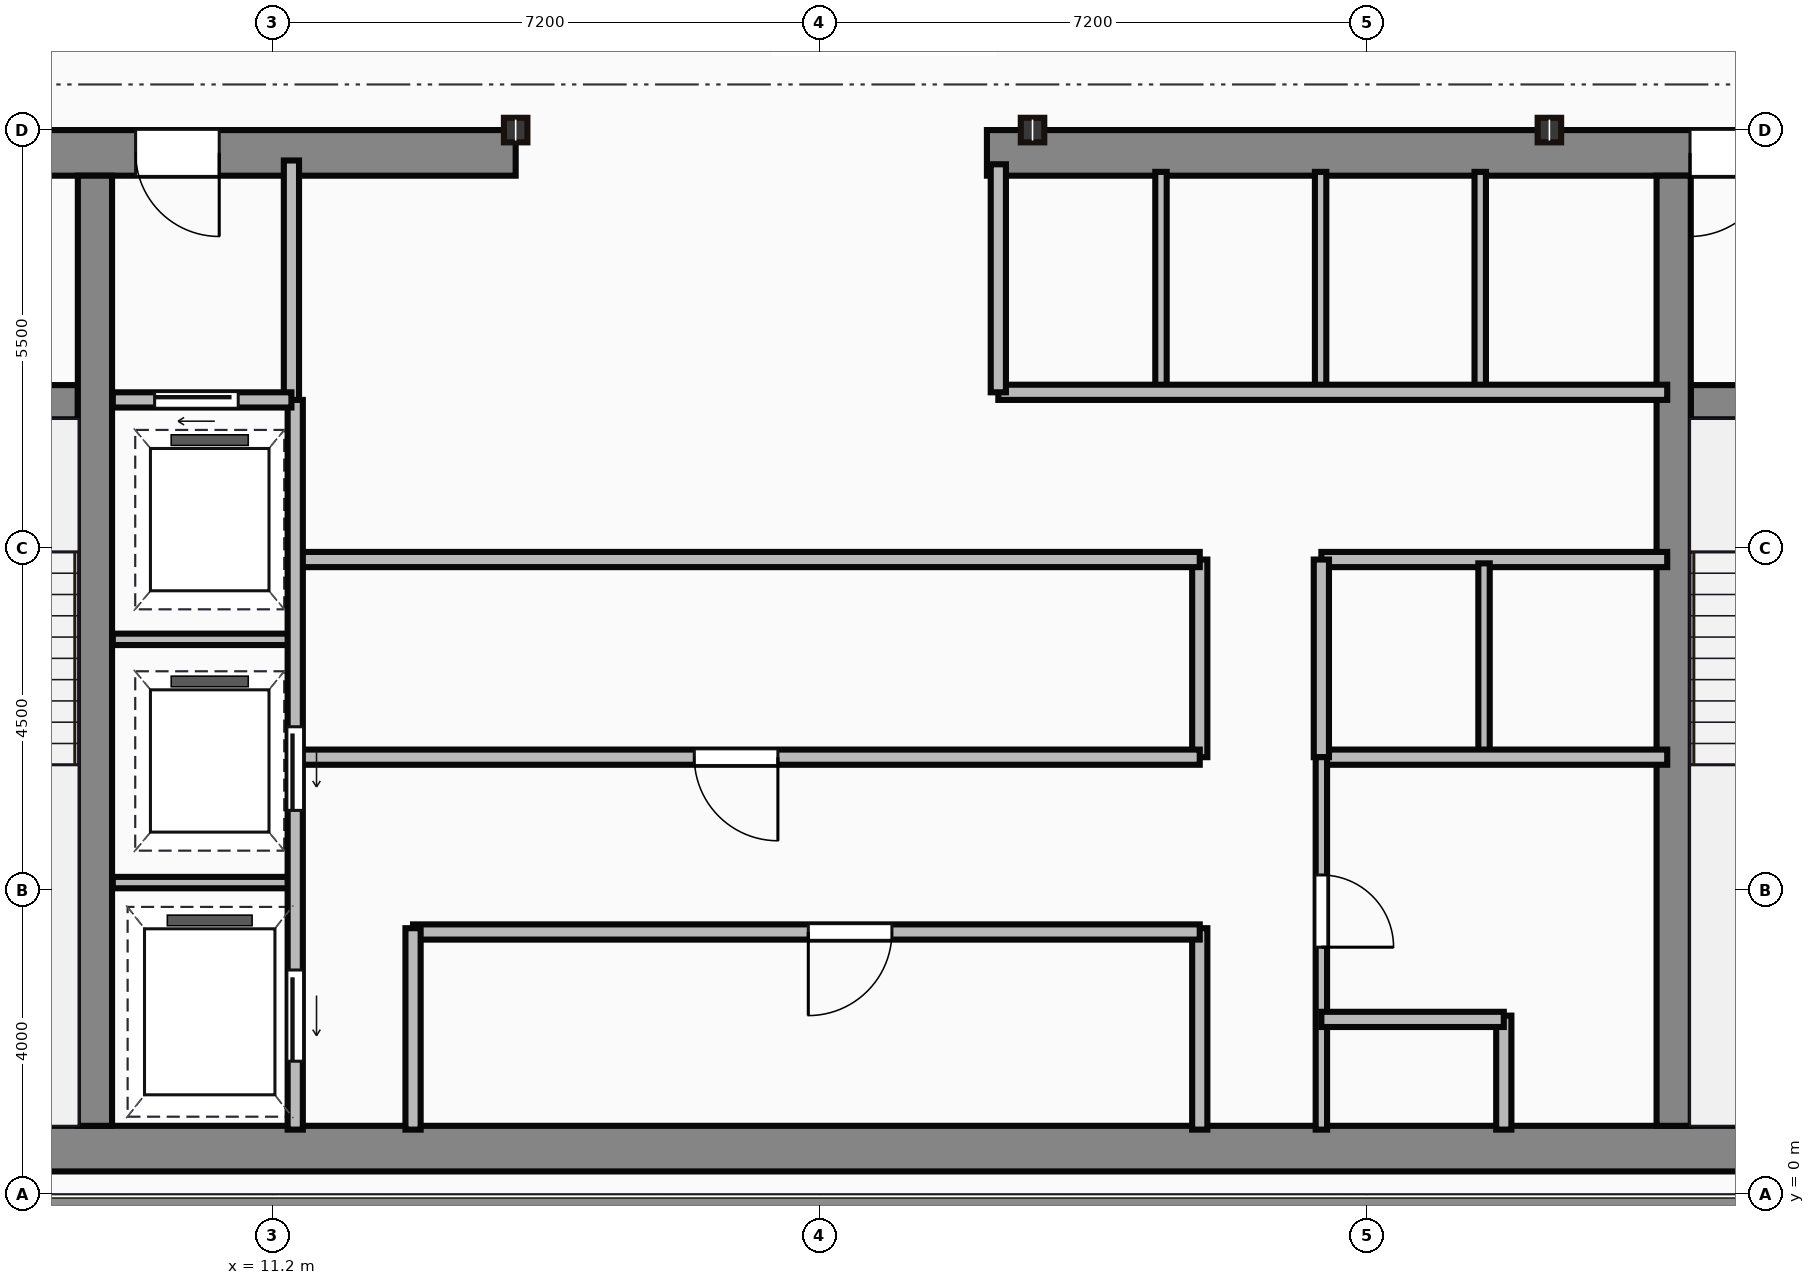
"""IFC4 building model, lengths in metres.
Left out: names, types, materials, properties, quantities, classifications, styles, units other than length and angle.
Written with IfcOpenShell. Run it as: python <this file> out.ifc"""

import sys

from ifc_helpers import new_model, si_unit, direction, frame, frame_2d, origin, origin_2d, place, context, subcontext, project, spatial, rectangle, i_section, extrude, source, transform, mapped, element, fill, save


model = new_model("IFC4")
c1 = context("Model", 3, precision=1e-05, world=origin(), true_north=direction((0.0, 1.0)))
c2 = subcontext(c1, "Body", "Model", "MODEL_VIEW")
j1 = project(units=[si_unit("LENGTHUNIT", "METRE"), si_unit("PLANEANGLEUNIT", "RADIAN")], contexts=[c1])
p1 = place(None, origin())
s1 = spatial("IfcSite", under=j1, at=p1, CompositionType="ELEMENT")
p2 = place(p1, origin())
s2 = spatial("IfcBuilding", under=s1, at=p2, CompositionType="ELEMENT")
p3 = place(p2, frame((0.0, 0.0, 292.25)))
s3 = spatial("IfcBuildingStorey", under=s2, at=p3, CompositionType="ELEMENT", Elevation=292.25)
m1 = source(origin(), c2, "Body", "SweptSolid", [
    extrude(rectangle(XDim=29.5, YDim=0.6, at=frame_2d((14.75, 0.0))), origin(), (0.0, 0.0, 1.0), 3.8),
])
p4 = place(p3, frame((4.5, 0.6, 0.0), z_axis=(0.0, 0.0, 1.0), x_axis=(1.0, 0.0, 0.0)))
e1 = element("IfcWall", 1, at=p4, inside=s3, PredefinedType="SHEAR", context=c2, shape_type="MappedRepresentation", body=[
    mapped(m1, transform((0.0, 0.0, 0.0))),
])
m2 = source(origin(), c2, "Body", "SweptSolid", [
    extrude(rectangle(XDim=9.1, YDim=0.6, at=frame_2d((4.55, 0.0))), origin(), (0.0, 0.0, 1.0), 3.8),
])
p5 = place(p3, frame((5.3, 13.7, 0.0), z_axis=(0.0, 0.0, 1.0), x_axis=(1.0, 0.0, 0.0)))
e2 = element("IfcWall", 2, at=p5, inside=s3, PredefinedType="SHEAR", context=c2, shape_type="MappedRepresentation", body=[
    mapped(m2, transform((0.0, 0.0, 0.0))),
])
p6 = place(p5, frame((4.1, 0.0, 0.0)))
e3 = element("IfcOpeningElement", 3, at=p6, cuts=e2, PredefinedType="OPENING", context=c2, shape_type="SweptSolid", body=[
    extrude(rectangle(XDim=1.1, YDim=2.15, at=frame_2d((0.55, 1.075))), frame((0.0, 0.31, 0.0), z_axis=(0.0, -1.0, 0.0), x_axis=(1.0, 0.0, 0.0)), (0.0, 0.0, 1.0), 0.62),
])
m3 = source(origin(), c2, "Body", "SweptSolid", [
    extrude(rectangle(XDim=12.6, YDim=0.6, at=frame_2d((6.3, 0.0))), origin(), (0.0, 0.0, 1.0), 3.8),
])
p7 = place(p3, frame((20.6, 13.7, 0.0), z_axis=(0.0, 0.0, 1.0), x_axis=(1.0, 0.0, 0.0)))
e4 = element("IfcWall", 4, at=p7, inside=s3, PredefinedType="SHEAR", context=c2, shape_type="MappedRepresentation", body=[
    mapped(m3, transform((0.0, 0.0, 0.0))),
])
p8 = place(p7, frame((9.25, 0.0, 0.0)))
e5 = element("IfcOpeningElement", 5, at=p8, cuts=e4, PredefinedType="OPENING", context=c2, shape_type="SweptSolid", body=[
    extrude(rectangle(XDim=1.1, YDim=2.15, at=frame_2d((0.55, 1.075))), frame((0.0, 0.31, 0.0), z_axis=(0.0, -1.0, 0.0), x_axis=(1.0, 0.0, 0.0)), (0.0, 0.0, 1.0), 0.62),
])
m4 = source(origin(), c2, "Body", "SweptSolid", [
    extrude(rectangle(XDim=12.5, YDim=0.45, at=frame_2d((6.25, 0.0))), origin(), (0.0, 0.0, 1.0), 3.8),
])
for number, where, z_axis, x_axis in (
    (6, (8.865, 0.9, 0.0), (0.0, 0.0, 1.0), (0.0, 1.0, 0.0)),
    (7, (29.635, 0.9, 0.0), (0.0, 0.0, 1.0), (0.0, 1.0, 0.0)),
):
    element("IfcWall", number, at=place(p3, frame(where, z_axis=z_axis, x_axis=x_axis)), inside=s3, PredefinedType="SHEAR", context=c2, shape_type="MappedRepresentation", body=[
        mapped(m4, transform((0.0, 0.0, 0.0))),
    ])
m5 = source(origin(), c2, "Body", "SweptSolid", [
    extrude(rectangle(XDim=3.39, YDim=0.45, at=frame_2d((1.695, 0.0))), origin(), (0.0, 0.0, 1.0), 3.8),
])
p9 = place(p3, frame((5.25, 10.42, 0.0), z_axis=(0.0, 0.0, 1.0), x_axis=(1.0, 0.0, 0.0)))
e8 = element("IfcWall", 8, at=p9, inside=s3, PredefinedType="SHEAR", context=c2, shape_type="MappedRepresentation", body=[
    mapped(m5, transform((0.0, 0.0, 0.0))),
])
p10 = place(p9, frame((1.05, 0.0, 0.0)))
e9 = element("IfcOpeningElement", 9, at=p10, cuts=e8, PredefinedType="OPENING", context=c2, shape_type="SweptSolid", body=[
    extrude(rectangle(XDim=1.1, YDim=2.15, at=frame_2d((0.55, 1.075))), frame((0.0, 0.235, 0.0), z_axis=(0.0, -1.0, 0.0), x_axis=(1.0, 0.0, 0.0)), (0.0, 0.0, 1.0), 0.47),
])
p11 = place(p3, frame((29.86, 10.42, 0.0), z_axis=(0.0, 0.0, 1.0), x_axis=(1.0, 0.0, 0.0)))
e10 = element("IfcWall", 10, at=p11, inside=s3, PredefinedType="SHEAR", context=c2, shape_type="MappedRepresentation", body=[
    mapped(m5, transform((0.0, 0.0, 0.0))),
])
p12 = place(p11, frame((1.1, 0.0, 0.0)))
e11 = element("IfcOpeningElement", 11, at=p12, cuts=e10, PredefinedType="OPENING", context=c2, shape_type="SweptSolid", body=[
    extrude(rectangle(XDim=1.1, YDim=2.15, at=frame_2d((0.55, 1.075))), frame((0.0, 0.235, 0.0), z_axis=(0.0, -1.0, 0.0), x_axis=(1.0, 0.0, 0.0)), (0.0, 0.0, 1.0), 0.47),
])
m6 = source(origin(), c2, "Body", "SweptSolid", [
    extrude(i_section(OverallWidth=0.309, OverallDepth=0.323, WebThickness=0.014, FlangeThickness=0.023, at=origin_2d()), origin(), (0.0, 0.0, 1.0), 3.8),
])
for number, where, z_axis, x_axis in (
    (12, (14.4, 14.0, 0.0), (0.0, 0.0, 1.0), (1.0, 0.0, 0.0)),
    (13, (21.2, 14.0, 0.0), (0.0, 0.0, 1.0), (1.0, 0.0, 0.0)),
    (14, (28.0, 14.0, 0.0), (0.0, 0.0, 1.0), (1.0, 0.0, 0.0)),
):
    element("IfcColumn", number, at=place(p3, frame(where, z_axis=z_axis, x_axis=x_axis)), inside=s3, PredefinedType="COLUMN", context=c2, shape_type="MappedRepresentation", body=[
        mapped(m6, transform((0.0, 0.0, 0.0))),
    ])
m7 = source(origin(), c2, "Body", "SweptSolid", [
    extrude(rectangle(XDim=3.18, YDim=0.2, at=frame_2d((1.59, 0.0))), origin(), (0.0, 0.0, 1.0), 3.5),
])
p13 = place(p3, frame((11.45, 10.42, 0.0), z_axis=(0.0, 0.0, 1.0), x_axis=(0.0, 1.0, 0.0)))
e15 = element("IfcWall", 15, at=p13, inside=s3, PredefinedType="PARTITIONING", context=c2, shape_type="MappedRepresentation", body=[
    mapped(m7, transform((0.0, 0.0, 0.0))),
])
m8 = source(origin(), c2, "Body", "SweptSolid", [
    extrude(rectangle(XDim=2.35, YDim=0.2, at=frame_2d((1.175, 0.0))), origin(), (0.0, 0.0, 1.0), 3.5),
])
p14 = place(p3, frame((9.1, 10.45, 0.0), z_axis=(0.0, 0.0, 1.0), x_axis=(1.0, 0.0, 0.0)))
e16 = element("IfcWall", 16, at=p14, inside=s3, PredefinedType="PARTITIONING", context=c2, shape_type="MappedRepresentation", body=[
    mapped(m8, transform((0.0, 0.0, 0.0))),
])
p15 = place(p14, frame((0.55, 0.0, 0.0)))
e17 = element("IfcOpeningElement", 17, at=p15, cuts=e16, PredefinedType="OPENING", context=c2, shape_type="SweptSolid", body=[
    extrude(rectangle(XDim=1.1, YDim=2.15, at=frame_2d((0.55, 1.075))), frame((0.0, 0.11, 0.0), z_axis=(0.0, -1.0, 0.0), x_axis=(1.0, 0.0, 0.0)), (0.0, 0.0, 1.0), 0.22),
])
m9 = source(origin(), c2, "Body", "SweptSolid", [
    extrude(rectangle(XDim=9.6, YDim=0.2, at=frame_2d((4.8, 0.0))), origin(), (0.0, 0.0, 1.0), 3.5),
])
p16 = place(p3, frame((11.5, 0.85, 0.0), z_axis=(0.0, 0.0, 1.0), x_axis=(0.0, 1.0, 0.0)))
e18 = element("IfcWall", 18, at=p16, inside=s3, PredefinedType="PARTITIONING", context=c2, shape_type="MappedRepresentation", body=[
    mapped(m9, transform((0.0, 0.0, 0.0))),
])
p17 = place(p16, frame((4.2, 0.0, 0.0)))
e19 = element("IfcOpeningElement", 19, at=p17, cuts=e18, PredefinedType="OPENING", context=c2, shape_type="SweptSolid", body=[
    extrude(rectangle(XDim=1.1, YDim=2.15, at=frame_2d((0.55, 1.075))), frame((0.0, 0.11, 0.0), z_axis=(0.0, -1.0, 0.0), x_axis=(1.0, 0.0, 0.0)), (0.0, 0.0, 1.0), 0.22),
])
p18 = place(p16, frame((0.9, 0.0, 0.0)))
e20 = element("IfcOpeningElement", 20, at=p18, cuts=e18, PredefinedType="OPENING", context=c2, shape_type="SweptSolid", body=[
    extrude(rectangle(XDim=1.2, YDim=2.15, at=frame_2d((0.6, 1.075))), frame((0.0, 0.11, 0.0), z_axis=(0.0, -1.0, 0.0), x_axis=(1.0, 0.0, 0.0)), (0.0, 0.0, 1.0), 0.22),
])
m10 = source(origin(), c2, "Body", "SweptSolid", [
    extrude(rectangle(XDim=2.4, YDim=0.15, at=frame_2d((1.2, 0.0))), origin(), (0.0, 0.0, 1.0), 3.5),
])
for number, where, z_axis, x_axis in (
    (21, (9.1, 4.1, 0.0), (0.0, 0.0, 1.0), (1.0, 0.0, 0.0)),
    (22, (9.1, 7.3, 0.0), (0.0, 0.0, 1.0), (1.0, 0.0, 0.0)),
):
    element("IfcWall", number, at=place(p3, frame(where, z_axis=z_axis, x_axis=x_axis)), inside=s3, PredefinedType="PARTITIONING", context=c2, shape_type="MappedRepresentation", body=[
        mapped(m10, transform((0.0, 0.0, 0.0))),
    ])
m11 = source(origin(), c2, "Body", "SweptSolid", [
    extrude(rectangle(XDim=2.65, YDim=0.2, at=frame_2d((1.325, 0.0))), origin(), (0.0, 0.0, 1.0), 3.5),
])
p19 = place(p3, frame((13.05, 0.85, 0.0), z_axis=(0.0, 0.0, 1.0), x_axis=(0.0, 1.0, 0.0)))
e23 = element("IfcWall", 23, at=p19, inside=s3, PredefinedType="PARTITIONING", context=c2, shape_type="MappedRepresentation", body=[
    mapped(m11, transform((0.0, 0.0, 0.0))),
])
m12 = source(origin(), c2, "Body", "SweptSolid", [
    extrude(rectangle(XDim=10.35, YDim=0.2, at=frame_2d((5.175, 0.0))), origin(), (0.0, 0.0, 1.0), 3.5),
])
p20 = place(p3, frame((13.05, 3.45, 0.0), z_axis=(0.0, 0.0, 1.0), x_axis=(1.0, 0.0, 0.0)))
e24 = element("IfcWall", 24, at=p20, inside=s3, PredefinedType="PARTITIONING", context=c2, shape_type="MappedRepresentation", body=[
    mapped(m12, transform((0.0, 0.0, 0.0))),
])
p21 = place(p20, frame((5.2, 0.0, 0.0)))
e25 = element("IfcOpeningElement", 25, at=p21, cuts=e24, PredefinedType="OPENING", context=c2, shape_type="SweptSolid", body=[
    extrude(rectangle(XDim=1.1, YDim=2.15, at=frame_2d((0.55, 1.075))), frame((0.0, 0.11, 0.0), z_axis=(0.0, -1.0, 0.0), x_axis=(1.0, 0.0, 0.0)), (0.0, 0.0, 1.0), 0.22),
])
p22 = place(p3, frame((23.4, 0.85, 0.0), z_axis=(0.0, 0.0, 1.0), x_axis=(0.0, 1.0, 0.0)))
e26 = element("IfcWall", 26, at=p22, inside=s3, PredefinedType="PARTITIONING", context=c2, shape_type="MappedRepresentation", body=[
    mapped(m11, transform((0.0, 0.0, 0.0))),
])
m13 = source(origin(), c2, "Body", "SweptSolid", [
    extrude(rectangle(XDim=11.85, YDim=0.2, at=frame_2d((5.925, 0.0))), origin(), (0.0, 0.0, 1.0), 3.5),
])
p23 = place(p3, frame((11.55, 5.75, 0.0), z_axis=(0.0, 0.0, 1.0), x_axis=(1.0, 0.0, 0.0)))
e27 = element("IfcWall", 27, at=p23, inside=s3, PredefinedType="PARTITIONING", context=c2, shape_type="MappedRepresentation", body=[
    mapped(m13, transform((0.0, 0.0, 0.0))),
])
p24 = place(p23, frame((5.2, 0.0, 0.0)))
e28 = element("IfcOpeningElement", 28, at=p24, cuts=e27, PredefinedType="OPENING", context=c2, shape_type="SweptSolid", body=[
    extrude(rectangle(XDim=1.1, YDim=2.15, at=frame_2d((0.55, 1.075))), frame((0.0, 0.11, 0.0), z_axis=(0.0, -1.0, 0.0), x_axis=(1.0, 0.0, 0.0)), (0.0, 0.0, 1.0), 0.22),
])
p25 = place(p3, frame((11.55, 8.35, 0.0), z_axis=(0.0, 0.0, 1.0), x_axis=(1.0, 0.0, 0.0)))
e29 = element("IfcWall", 29, at=p25, inside=s3, PredefinedType="PARTITIONING", context=c2, shape_type="MappedRepresentation", body=[
    mapped(m13, transform((0.0, 0.0, 0.0))),
])
m14 = source(origin(), c2, "Body", "SweptSolid", [
    extrude(rectangle(XDim=2.6, YDim=0.2, at=frame_2d((1.3, 0.0))), origin(), (0.0, 0.0, 1.0), 3.5),
])
p26 = place(p3, frame((23.4, 5.75, 0.0), z_axis=(0.0, 0.0, 1.0), x_axis=(0.0, 1.0, 0.0)))
e30 = element("IfcWall", 30, at=p26, inside=s3, PredefinedType="PARTITIONING", context=c2, shape_type="MappedRepresentation", body=[
    mapped(m14, transform((0.0, 0.0, 0.0))),
])
m15 = source(origin(), c2, "Body", "SweptSolid", [
    extrude(rectangle(XDim=8.8, YDim=0.2, at=frame_2d((4.4, 0.0))), origin(), (0.0, 0.0, 1.0), 3.5),
])
p27 = place(p3, frame((20.75, 10.55, 0.0), z_axis=(0.0, 0.0, 1.0), x_axis=(1.0, 0.0, 0.0)))
e31 = element("IfcWall", 31, at=p27, inside=s3, PredefinedType="PARTITIONING", context=c2, shape_type="MappedRepresentation", body=[
    mapped(m15, transform((0.0, 0.0, 0.0))),
])
m16 = source(origin(), c2, "Body", "SweptSolid", [
    extrude(rectangle(XDim=3.0, YDim=0.2, at=frame_2d((1.5, 0.0))), origin(), (0.0, 0.0, 1.0), 3.5),
])
p28 = place(p3, frame((20.75, 10.55, 0.0), z_axis=(0.0, 0.0, 1.0), x_axis=(0.0, 1.0, 0.0)))
e32 = element("IfcWall", 32, at=p28, inside=s3, PredefinedType="PARTITIONING", context=c2, shape_type="MappedRepresentation", body=[
    mapped(m16, transform((0.0, 0.0, 0.0))),
])
m17 = source(origin(), c2, "Body", "SweptSolid", [
    extrude(rectangle(XDim=2.85, YDim=0.15, at=frame_2d((1.425, 0.0))), origin(), (0.0, 0.0, 1.0), 3.5),
])
for number, where, z_axis, x_axis in (
    (33, (22.89, 10.6, 0.0), (0.0, 0.0, 1.0), (0.0, 1.0, 0.0)),
    (34, (24.99, 10.6, 0.0), (0.0, 0.0, 1.0), (0.0, 1.0, 0.0)),
    (35, (27.09, 10.6, 0.0), (0.0, 0.0, 1.0), (0.0, 1.0, 0.0)),
):
    element("IfcWall", number, at=place(p3, frame(where, z_axis=z_axis, x_axis=x_axis)), inside=s3, PredefinedType="PARTITIONING", context=c2, shape_type="MappedRepresentation", body=[
        mapped(m17, transform((0.0, 0.0, 0.0))),
    ])
m18 = source(origin(), c2, "Body", "SweptSolid", [
    extrude(rectangle(XDim=4.55, YDim=0.2, at=frame_2d((2.275, 0.0))), origin(), (0.0, 0.0, 1.0), 3.5),
])
for number, where, z_axis, x_axis in (
    (36, (25.0, 8.35, 0.0), (0.0, 0.0, 1.0), (1.0, 0.0, 0.0)),
    (37, (25.0, 5.75, 0.0), (0.0, 0.0, 1.0), (1.0, 0.0, 0.0)),
):
    element("IfcWall", number, at=place(p3, frame(where, z_axis=z_axis, x_axis=x_axis)), inside=s3, PredefinedType="PARTITIONING", context=c2, shape_type="MappedRepresentation", body=[
        mapped(m18, transform((0.0, 0.0, 0.0))),
    ])
p29 = place(p3, frame((25.0, 5.75, 0.0), z_axis=(0.0, 0.0, 1.0), x_axis=(0.0, 1.0, 0.0)))
e38 = element("IfcWall", 38, at=p29, inside=s3, PredefinedType="PARTITIONING", context=c2, shape_type="MappedRepresentation", body=[
    mapped(m14, transform((0.0, 0.0, 0.0))),
])
m19 = source(origin(), c2, "Body", "SweptSolid", [
    extrude(rectangle(XDim=2.5, YDim=0.15, at=frame_2d((1.25, 0.0))), origin(), (0.0, 0.0, 1.0), 3.5),
])
p30 = place(p3, frame((27.14, 5.8, 0.0), z_axis=(0.0, 0.0, 1.0), x_axis=(0.0, 1.0, 0.0)))
e39 = element("IfcWall", 39, at=p30, inside=s3, PredefinedType="PARTITIONING", context=c2, shape_type="MappedRepresentation", body=[
    mapped(m19, transform((0.0, 0.0, 0.0))),
])
m20 = source(origin(), c2, "Body", "SweptSolid", [
    extrude(rectangle(XDim=4.9, YDim=0.15, at=frame_2d((2.45, 0.0))), origin(), (0.0, 0.0, 1.0), 3.5),
])
p31 = place(p3, frame((25.0, 0.85, 0.0), z_axis=(0.0, 0.0, 1.0), x_axis=(0.0, 1.0, 0.0)))
e40 = element("IfcWall", 40, at=p31, inside=s3, PredefinedType="PARTITIONING", context=c2, shape_type="MappedRepresentation", body=[
    mapped(m20, transform((0.0, 0.0, 0.0))),
])
p32 = place(p31, frame((2.4, 0.0, 0.0)))
e41 = element("IfcOpeningElement", 41, at=p32, cuts=e40, PredefinedType="OPENING", context=c2, shape_type="SweptSolid", body=[
    extrude(rectangle(XDim=0.95, YDim=2.15, at=frame_2d((0.475, 1.075))), frame((0.0, 0.085, 0.0), z_axis=(0.0, -1.0, 0.0), x_axis=(1.0, 0.0, 0.0)), (0.0, 0.0, 1.0), 0.17),
])
m21 = source(origin(), c2, "Body", "SweptSolid", [
    extrude(rectangle(XDim=2.4, YDim=0.2, at=frame_2d((1.2, 0.0))), origin(), (0.0, 0.0, 1.0), 3.5),
])
p33 = place(p3, frame((25.0, 2.3, 0.0), z_axis=(0.0, 0.0, 1.0), x_axis=(1.0, 0.0, 0.0)))
e42 = element("IfcWall", 42, at=p33, inside=s3, PredefinedType="PARTITIONING", context=c2, shape_type="MappedRepresentation", body=[
    mapped(m21, transform((0.0, 0.0, 0.0))),
])
m22 = source(origin(), c2, "Body", "SweptSolid", [
    extrude(rectangle(XDim=1.5, YDim=0.2, at=frame_2d((0.75, 0.0))), origin(), (0.0, 0.0, 1.0), 3.5),
])
p34 = place(p3, frame((27.4, 0.85, 0.0), z_axis=(0.0, 0.0, 1.0), x_axis=(0.0, 1.0, 0.0)))
e43 = element("IfcWall", 43, at=p34, inside=s3, PredefinedType="PARTITIONING", context=c2, shape_type="MappedRepresentation", body=[
    mapped(m22, transform((0.0, 0.0, 0.0))),
])
m23 = source(origin(), c2, "Body", "SweptSolid", [
    extrude(rectangle(XDim=1.1, YDim=2.15, at=frame_2d((0.55, 1.075))), frame((0.0, 0.025, 0.0), z_axis=(0.0, -1.0, 0.0), x_axis=(1.0, 0.0, 0.0)), (0.0, 0.0, 1.0), 0.05),
])
p35 = place(p6, origin())
e44 = element("IfcDoor", 44, at=p35, inside=s3, OperationType="SINGLE_SWING_RIGHT", PredefinedType="DOOR", context=c2, shape_type="MappedRepresentation", body=[
    mapped(m23, transform((0.0, 0.0, 0.0))),
])
fill(e3, e44)
p36 = place(p8, origin())
e45 = element("IfcDoor", 45, at=p36, inside=s3, OperationType="SINGLE_SWING_LEFT", PredefinedType="DOOR", context=c2, shape_type="MappedRepresentation", body=[
    mapped(m23, transform((0.0, 0.0, 0.0))),
])
fill(e5, e45)
p37 = place(p15, origin())
e46 = element("IfcDoor", 46, at=p37, inside=s3, OperationType="SLIDING_TO_LEFT", PredefinedType="DOOR", context=c2, shape_type="MappedRepresentation", body=[
    mapped(m23, transform((0.0, 0.0, 0.0))),
])
fill(e17, e46)
p38 = place(p17, frame((1.1, 0.0, 0.0), z_axis=(0.0, 0.0, 1.0), x_axis=(-1.0, 0.0, 0.0)))
e47 = element("IfcDoor", 47, at=p38, inside=s3, OperationType="SLIDING_TO_LEFT", PredefinedType="DOOR", context=c2, shape_type="MappedRepresentation", body=[
    mapped(m23, transform((0.0, 0.0, 0.0))),
])
fill(e19, e47)
m24 = source(origin(), c2, "Body", "SweptSolid", [
    extrude(rectangle(XDim=1.2, YDim=2.15, at=frame_2d((0.6, 1.075))), frame((0.0, 0.025, 0.0), z_axis=(0.0, -1.0, 0.0), x_axis=(1.0, 0.0, 0.0)), (0.0, 0.0, 1.0), 0.05),
])
p39 = place(p18, frame((1.2, 0.0, 0.0), z_axis=(0.0, 0.0, 1.0), x_axis=(-1.0, 0.0, 0.0)))
e48 = element("IfcDoor", 48, at=p39, inside=s3, OperationType="SLIDING_TO_LEFT", PredefinedType="DOOR", context=c2, shape_type="MappedRepresentation", body=[
    mapped(m24, transform((0.0, 0.0, 0.0))),
])
fill(e20, e48)
p40 = place(p21, origin())
e49 = element("IfcDoor", 49, at=p40, inside=s3, OperationType="SINGLE_SWING_LEFT", PredefinedType="DOOR", context=c2, shape_type="MappedRepresentation", body=[
    mapped(m23, transform((0.0, 0.0, 0.0))),
])
fill(e25, e49)
p41 = place(p24, frame((1.1, 0.0, 0.0), z_axis=(0.0, 0.0, 1.0), x_axis=(-1.0, 0.0, 0.0)))
e50 = element("IfcDoor", 50, at=p41, inside=s3, OperationType="SINGLE_SWING_RIGHT", PredefinedType="DOOR", context=c2, shape_type="MappedRepresentation", body=[
    mapped(m23, transform((0.0, 0.0, 0.0))),
])
fill(e28, e50)
m25 = source(origin(), c2, "Body", "SweptSolid", [
    extrude(rectangle(XDim=0.95, YDim=2.15, at=frame_2d((0.475, 1.075))), frame((0.0, 0.025, 0.0), z_axis=(0.0, -1.0, 0.0), x_axis=(1.0, 0.0, 0.0)), (0.0, 0.0, 1.0), 0.05),
])
p42 = place(p32, origin())
e51 = element("IfcDoor", 51, at=p42, inside=s3, OperationType="SINGLE_SWING_LEFT", PredefinedType="DOOR", context=c2, shape_type="MappedRepresentation", body=[
    mapped(m25, transform((0.0, 0.0, 0.0))),
])
fill(e41, e51)
save(model, sys.argv[1])
